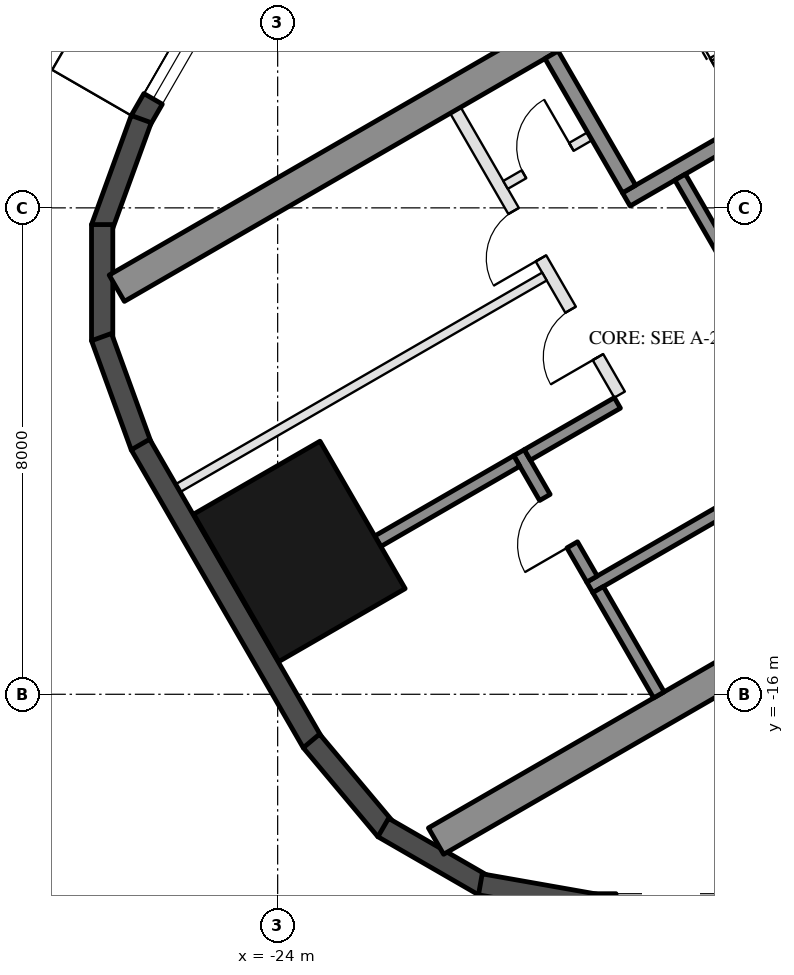
"""IFC4 building model, lengths in metres.
Left out: names, types, materials, properties, quantities, classifications, styles, units other than length and angle.
Written with IfcOpenShell. Run it as: python <this file> out.ifc"""

import sys

from ifc_helpers import new_model, si_unit, direction, frame, frame_2d, origin, origin_2d, place, context, subcontext, project, spatial, rectangle, hollow_rectangle, extrude, element, fill, save


model = new_model("IFC4")
c1 = context("Model", 3, precision=1e-05, world=origin(), true_north=direction((0.0, 1.0)))
c2 = subcontext(c1, "Body", "Model", "MODEL_VIEW")
j1 = project(units=[si_unit("LENGTHUNIT", "METRE"), si_unit("PLANEANGLEUNIT", "RADIAN")], contexts=[c1])
p1 = place(None, origin())
s1 = spatial("IfcSite", under=j1, at=p1, CompositionType="ELEMENT")
p2 = place(p1, origin())
s2 = spatial("IfcBuilding", under=s1, at=p2, CompositionType="ELEMENT")
p3 = place(p2, frame((0.0, 0.0, 90.9)))
s3 = spatial("IfcBuildingStorey", under=s2, at=p3, CompositionType="ELEMENT", Elevation=90.9)
p4 = place(p3, frame((-23.643, -13.65, 0.0), z_axis=(0.0, 0.0, 1.0), x_axis=(-0.5, 0.866025403784, 0.0)))
e1 = element("IfcColumn", 1, at=p4, inside=s3, PredefinedType="COLUMN", context=c2, shape_type="SweptSolid", body=[
    extrude(hollow_rectangle(XDim=2.8, YDim=2.4, WallThickness=0.07, at=origin_2d()), origin(), (0.0, 0.0, 1.0), 3.7),
])
p5 = place(p3, frame((-24.299, -3.176, 0.0), z_axis=(0.0, 0.0, 1.0), x_axis=(-0.500028278809, -0.866009076391, 0.0)))
e2 = element("IfcWall", 2, at=p5, inside=s3, PredefinedType="SOLIDWALL", context=c2, shape_type="SweptSolid", body=[
    extrude(rectangle(XDim=3.916, YDim=0.35, at=frame_2d((1.958, 0.0))), origin(), (0.0, 0.0, 1.0), 3.55),
])
p6 = place(p5, frame((1.7, 0.0, 0.3)))
e3 = element("IfcOpeningElement", 3, at=p6, cuts=e2, PredefinedType="OPENING", context=c2, shape_type="SweptSolid", body=[
    extrude(rectangle(XDim=1.8, YDim=2.65, at=frame_2d((0.9, 1.325))), frame((0.0, 0.185, 0.0), z_axis=(0.0, -1.0, 0.0), x_axis=(1.0, 0.0, 0.0)), (0.0, 0.0, 1.0), 0.37),
])
for number, where, z_axis, x_axis in (
    (4, (-26.244, -6.54, 0.0), (0.0, 0.0, 1.0), (-0.342, -0.94, 0.0)),
    (5, (-26.886, -8.275, 0.0), (0.0, 0.0, 1.0), (0.0, -1.0, 0.0)),
    (6, (-26.897, -10.125, 0.0), (0.0, 0.0, 1.0), (0.342, -0.94, 0.0)),
):
    element("IfcWall", number, at=place(p3, frame(where, z_axis=z_axis, x_axis=x_axis)), inside=s3, PredefinedType="SOLIDWALL", context=c2, shape_type="SweptSolid", body=[
        extrude(rectangle(XDim=1.91, YDim=0.35, at=frame_2d((0.955, 0.0))), origin(), (0.0, 0.0, 1.0), 3.55),
    ])
p7 = place(p3, frame((-26.257, -11.893, 0.0), z_axis=(0.0, 0.0, 1.0), x_axis=(0.500018773155, -0.866014564827, 0.0)))
e7 = element("IfcWall", 7, at=p7, inside=s3, PredefinedType="SOLIDWALL", context=c2, shape_type="SweptSolid", body=[
    extrude(rectangle(XDim=5.658, YDim=0.35, at=frame_2d((2.829, 0.0))), origin(), (0.0, 0.0, 1.0), 3.55),
])
for number, where, z_axis, x_axis in (
    (8, (-23.445, -16.768, 0.0), (0.0, 0.0, 1.0), (0.643, -0.766, 0.0)),
    (9, (-22.264, -18.192, 0.0), (0.0, 0.0, 1.0), (0.866, -0.5, 0.0)),
):
    element("IfcWall", number, at=place(p3, frame(where, z_axis=z_axis, x_axis=x_axis)), inside=s3, PredefinedType="SOLIDWALL", context=c2, shape_type="SweptSolid", body=[
        extrude(rectangle(XDim=1.91, YDim=0.35, at=frame_2d((0.955, 0.0))), origin(), (0.0, 0.0, 1.0), 3.55),
    ])
p8 = place(p3, frame((-20.667, -19.126, 0.0), z_axis=(0.0, 0.0, 1.0), x_axis=(0.984798995425, -0.173697837091, 0.0)))
e10 = element("IfcWall", 10, at=p8, inside=s3, PredefinedType="SOLIDWALL", context=c2, shape_type="SweptSolid", body=[
    extrude(rectangle(XDim=1.91, YDim=0.35, at=frame_2d((0.955, 0.0))), origin(), (0.0, 0.0, 1.0), 3.55),
])
p9 = place(p3, frame((-18.816, -19.455, 0.0), z_axis=(0.0, 0.0, 1.0), x_axis=(1.0, 0.0, 0.0)))
e11 = element("IfcWall", 11, at=p9, inside=s3, PredefinedType="SOLIDWALL", context=c2, shape_type="SweptSolid", body=[
    extrude(rectangle(XDim=11.816, YDim=0.35, at=frame_2d((5.908, 0.0))), origin(), (0.0, 0.0, 1.0), 3.55),
])
p10 = place(p9, frame((0.381, 0.0, 0.3)))
e12 = element("IfcOpeningElement", 12, at=p10, cuts=e11, PredefinedType="OPENING", context=c2, shape_type="SweptSolid", body=[
    extrude(rectangle(XDim=1.8, YDim=2.65, at=frame_2d((0.9, 1.325))), frame((0.0, 0.185, 0.0), z_axis=(0.0, -1.0, 0.0), x_axis=(1.0, 0.0, 0.0)), (0.0, 0.0, 1.0), 0.37),
])
p11 = place(p9, frame((7.716, 0.0, 0.0)))
e13 = element("IfcOpeningElement", 13, at=p11, cuts=e11, PredefinedType="OPENING", context=c2, shape_type="SweptSolid", body=[
    extrude(rectangle(XDim=2.4, YDim=2.4, at=frame_2d((1.2, 1.2))), frame((0.0, 0.185, 0.0), z_axis=(0.0, -1.0, 0.0), x_axis=(1.0, 0.0, 0.0)), (0.0, 0.0, 1.0), 0.37),
])
p12 = place(p9, frame((3.816, 0.0, 0.3)))
e14 = element("IfcOpeningElement", 14, at=p12, cuts=e11, PredefinedType="OPENING", context=c2, shape_type="SweptSolid", body=[
    extrude(rectangle(XDim=1.6, YDim=2.65, at=frame_2d((0.8, 1.325))), frame((0.0, 0.185, 0.0), z_axis=(0.0, -1.0, 0.0), x_axis=(1.0, 0.0, 0.0)), (0.0, 0.0, 1.0), 0.37),
])
p13 = place(p9, frame((5.716, 0.0, 0.3)))
e15 = element("IfcOpeningElement", 15, at=p13, cuts=e11, PredefinedType="OPENING", context=c2, shape_type="SweptSolid", body=[
    extrude(rectangle(XDim=1.6, YDim=2.65, at=frame_2d((0.8, 1.325))), frame((0.0, 0.185, 0.0), z_axis=(0.0, -1.0, 0.0), x_axis=(1.0, 0.0, 0.0)), (0.0, 0.0, 1.0), 0.37),
])
for number, where, z_axis, x_axis in (
    (16, (-13.797, -1.903, 0.0), (0.0, 0.0, 1.0), (-0.866, -0.5, 0.0)),
    (17, (-8.547, -10.997, 0.0), (0.0, 0.0, 1.0), (-0.866, -0.5, 0.0)),
):
    element("IfcWall", number, at=place(p3, frame(where, z_axis=z_axis, x_axis=x_axis)), inside=s3, PredefinedType="SHEAR", context=c2, shape_type="SweptSolid", body=[
        extrude(rectangle(XDim=14.837, YDim=0.5, at=frame_2d((7.418, 0.0))), origin(), (0.0, 0.0, 1.0), 3.5),
    ])
p14 = place(p3, frame((-12.681, -4.636, 0.0), z_axis=(0.0, 0.0, 1.0), x_axis=(-0.866021702275, -0.500006411147, 0.0)))
e18 = element("IfcWall", 18, at=p14, inside=s3, PredefinedType="SHEAR", context=c2, shape_type="SweptSolid", body=[
    extrude(rectangle(XDim=6.45, YDim=0.25, at=frame_2d((3.225, 0.0))), origin(), (0.0, 0.0, 1.0), 3.5),
])
p15 = place(p14, frame((0.3, 0.0, 0.0)))
e19 = element("IfcOpeningElement", 19, at=p15, cuts=e18, PredefinedType="OPENING", context=c2, shape_type="SweptSolid", body=[
    extrude(rectangle(XDim=1.0, YDim=2.1, at=frame_2d((0.5, 1.05))), frame((0.0, 0.135, 0.0), z_axis=(0.0, -1.0, 0.0), x_axis=(1.0, 0.0, 0.0)), (0.0, 0.0, 1.0), 0.27),
])
p16 = place(p3, frame((-19.496, -5.482, 0.0), z_axis=(0.0, 0.0, 1.0), x_axis=(0.499990435942, -0.866030925526, 0.0)))
e20 = element("IfcWall", 20, at=p16, inside=s3, PredefinedType="SHEAR", context=c2, shape_type="SweptSolid", body=[
    extrude(rectangle(XDim=2.55, YDim=0.25, at=frame_2d((1.275, 0.0))), origin(), (0.0, 0.0, 1.0), 3.5),
])
p17 = place(p3, frame((-17.381, -7.495, 0.0), z_axis=(0.0, 0.0, 1.0), x_axis=(0.500011755427, -0.866018616679, 0.0)))
e21 = element("IfcWall", 21, at=p17, inside=s3, PredefinedType="SHEAR", context=c2, shape_type="SweptSolid", body=[
    extrude(rectangle(XDim=2.8, YDim=0.2, at=frame_2d((1.4, 0.0))), origin(), (0.0, 0.0, 1.0), 3.5),
])
p18 = place(p3, frame((-10.068, -9.162, 0.0), z_axis=(0.0, 0.0, 1.0), x_axis=(-0.866032725843, -0.499987317609, 0.0)))
e22 = element("IfcWall", 22, at=p18, inside=s3, PredefinedType="SHEAR", context=c2, shape_type="SweptSolid", body=[
    extrude(rectangle(XDim=10.16, YDim=0.2, at=frame_2d((5.08, 0.0))), origin(), (0.0, 0.0, 1.0), 3.5),
])
p19 = place(p18, frame((0.72, 0.0, 0.0)))
e23 = element("IfcOpeningElement", 23, at=p19, cuts=e22, PredefinedType="OPENING", context=c2, shape_type="SweptSolid", body=[
    extrude(rectangle(XDim=0.9, YDim=2.1, at=frame_2d((0.45, 1.05))), frame((0.0, 0.11, 0.0), z_axis=(0.0, -1.0, 0.0), x_axis=(1.0, 0.0, 0.0)), (0.0, 0.0, 1.0), 0.22),
])
p20 = place(p18, frame((5.8, 0.0, 0.0)))
e24 = element("IfcOpeningElement", 24, at=p20, cuts=e22, PredefinedType="OPENING", context=c2, shape_type="SweptSolid", body=[
    extrude(rectangle(XDim=0.9, YDim=2.1, at=frame_2d((0.45, 1.05))), frame((0.0, 0.11, 0.0), z_axis=(0.0, -1.0, 0.0), x_axis=(1.0, 0.0, 0.0)), (0.0, 0.0, 1.0), 0.22),
])
p21 = place(p3, frame((-20.031, -12.026, 0.0), z_axis=(0.0, 0.0, 1.0), x_axis=(0.500033551112, -0.866006032174, 0.0)))
e25 = element("IfcWall", 25, at=p21, inside=s3, PredefinedType="SHEAR", context=c2, shape_type="SweptSolid", body=[
    extrude(rectangle(XDim=2.4, YDim=0.2, at=frame_2d((1.2, 0.0))), origin(), (0.0, 0.0, 1.0), 3.5),
])
p22 = place(p21, frame((0.85, 0.0, 0.0)))
e26 = element("IfcOpeningElement", 26, at=p22, cuts=e25, PredefinedType="OPENING", context=c2, shape_type="SweptSolid", body=[
    extrude(rectangle(XDim=0.9, YDim=2.1, at=frame_2d((0.45, 1.05))), frame((0.0, 0.11, 0.0), z_axis=(0.0, -1.0, 0.0), x_axis=(1.0, 0.0, 0.0)), (0.0, 0.0, 1.0), 0.22),
])
p23 = place(p3, frame((-18.413, -11.208, 0.0), z_axis=(0.0, 0.0, 1.0), x_axis=(-0.866038183914, -0.499977863513, 0.0)))
e27 = element("IfcWall", 27, at=p23, inside=s3, PredefinedType="SHEAR", context=c2, shape_type="SweptSolid", body=[
    extrude(rectangle(XDim=1.71, YDim=0.2, at=frame_2d((0.855, 0.0))), origin(), (0.0, 0.0, 1.0), 3.5),
])
p24 = place(p3, frame((-18.73, -14.278, 0.0), z_axis=(0.0, 0.0, 1.0), x_axis=(0.50002537861, -0.866010750942, 0.0)))
e28 = element("IfcWall", 28, at=p24, inside=s3, PredefinedType="SHEAR", context=c2, shape_type="SweptSolid", body=[
    extrude(rectangle(XDim=2.0, YDim=0.2, at=frame_2d((1.0, 0.0))), origin(), (0.0, 0.0, 1.0), 3.5),
])
p25 = place(p3, frame((-20.067, -12.163, 0.0), z_axis=(0.0, 0.0, 1.0), x_axis=(-0.866060851709, -0.499938597367, 0.0)))
e29 = element("IfcWall", 29, at=p25, inside=s3, PredefinedType="SHEAR", context=c2, shape_type="SweptSolid", body=[
    extrude(rectangle(XDim=2.64, YDim=0.2, at=frame_2d((1.32, 0.0))), origin(), (0.0, 0.0, 1.0), 3.5),
])
p26 = place(p3, frame((-21.076, -6.395, 0.0), z_axis=(0.0, 0.0, 1.0), x_axis=(0.50001468107, -0.866016927499, 0.0)))
e30 = element("IfcWall", 30, at=p26, inside=s3, PredefinedType="PARTITIONING", context=c2, shape_type="SweptSolid", body=[
    extrude(rectangle(XDim=5.4, YDim=0.2, at=frame_2d((2.7, 0.0))), origin(), (0.0, 0.0, 1.0), 3.5),
])
p27 = place(p26, frame((1.913, 0.0, 0.0)))
e31 = element("IfcOpeningElement", 31, at=p27, cuts=e30, PredefinedType="OPENING", context=c2, shape_type="SweptSolid", body=[
    extrude(rectangle(XDim=0.9, YDim=2.1, at=frame_2d((0.45, 1.05))), frame((0.0, 0.11, 0.0), z_axis=(0.0, -1.0, 0.0), x_axis=(1.0, 0.0, 0.0)), (0.0, 0.0, 1.0), 0.22),
])
p28 = place(p26, frame((3.788, 0.0, 0.0)))
e32 = element("IfcOpeningElement", 32, at=p28, cuts=e30, PredefinedType="OPENING", context=c2, shape_type="SweptSolid", body=[
    extrude(rectangle(XDim=0.9, YDim=2.1, at=frame_2d((0.45, 1.05))), frame((0.0, 0.11, 0.0), z_axis=(0.0, -1.0, 0.0), x_axis=(1.0, 0.0, 0.0)), (0.0, 0.0, 1.0), 0.22),
])
p29 = place(p3, frame((-18.866, -6.822, 0.0), z_axis=(0.0, 0.0, 1.0), x_axis=(-0.866028054938, -0.499995408039, 0.0)))
e33 = element("IfcWall", 33, at=p29, inside=s3, PredefinedType="PARTITIONING", context=c2, shape_type="SweptSolid", body=[
    extrude(rectangle(XDim=1.6, YDim=0.15, at=frame_2d((0.8, 0.0))), origin(), (0.0, 0.0, 1.0), 3.5),
])
p30 = place(p29, frame((0.35, 0.0, 0.0)))
e34 = element("IfcOpeningElement", 34, at=p30, cuts=e33, PredefinedType="OPENING", context=c2, shape_type="SweptSolid", body=[
    extrude(rectangle(XDim=0.9, YDim=2.1, at=frame_2d((0.45, 1.05))), frame((0.0, 0.085, 0.0), z_axis=(0.0, -1.0, 0.0), x_axis=(1.0, 0.0, 0.0)), (0.0, 0.0, 1.0), 0.17),
])
p31 = place(p3, frame((-19.613, -9.13, 0.0), z_axis=(0.0, 0.0, 1.0), x_axis=(-0.866031734426, -0.499989034847, 0.0)))
e35 = element("IfcWall", 35, at=p31, inside=s3, PredefinedType="PARTITIONING", context=c2, shape_type="SweptSolid", body=[
    extrude(rectangle(XDim=6.95, YDim=0.15, at=frame_2d((3.475, 0.0))), origin(), (0.0, 0.0, 1.0), 3.5),
])
p32 = place(p6, origin())
e36 = element("IfcWindow", 36, at=p32, inside=s3, PartitioningType="SINGLE_PANEL", PredefinedType="WINDOW", context=c2, shape_type="SweptSolid", body=[
    extrude(rectangle(XDim=1.8, YDim=2.65, at=frame_2d((0.9, 1.325))), frame((0.0, 0.03, 0.0), z_axis=(0.0, -1.0, 0.0), x_axis=(1.0, 0.0, 0.0)), (0.0, 0.0, 1.0), 0.06),
])
fill(e3, e36)
p33 = place(p30, frame((0.9, 0.0, 0.0), z_axis=(0.0, 0.0, 1.0), x_axis=(-1.0, 0.0, 0.0)))
e37 = element("IfcDoor", 37, at=p33, inside=s3, OperationType="SINGLE_SWING_RIGHT", PredefinedType="DOOR", context=c2, shape_type="SweptSolid", body=[
    extrude(rectangle(XDim=0.9, YDim=2.1, at=frame_2d((0.45, 1.05))), frame((0.0, 0.025, 0.0), z_axis=(0.0, -1.0, 0.0), x_axis=(1.0, 0.0, 0.0)), (0.0, 0.0, 1.0), 0.05),
])
fill(e34, e37)
p34 = place(p22, frame((0.9, 0.0, 0.0), z_axis=(0.0, 0.0, 1.0), x_axis=(-1.0, 0.0, 0.0)))
e38 = element("IfcDoor", 38, at=p34, inside=s3, OperationType="SINGLE_SWING_LEFT", PredefinedType="DOOR", context=c2, shape_type="SweptSolid", body=[
    extrude(rectangle(XDim=0.9, YDim=2.1, at=frame_2d((0.45, 1.05))), frame((0.0, 0.025, 0.0), z_axis=(0.0, -1.0, 0.0), x_axis=(1.0, 0.0, 0.0)), (0.0, 0.0, 1.0), 0.05),
])
fill(e26, e38)
p35 = place(p27, frame((0.9, 0.0, 0.0), z_axis=(0.0, 0.0, 1.0), x_axis=(-1.0, 0.0, 0.0)))
e39 = element("IfcDoor", 39, at=p35, inside=s3, OperationType="SINGLE_SWING_LEFT", PredefinedType="DOOR", context=c2, shape_type="SweptSolid", body=[
    extrude(rectangle(XDim=0.9, YDim=2.1, at=frame_2d((0.45, 1.05))), frame((0.0, 0.025, 0.0), z_axis=(0.0, -1.0, 0.0), x_axis=(1.0, 0.0, 0.0)), (0.0, 0.0, 1.0), 0.05),
])
fill(e31, e39)
p36 = place(p28, frame((0.9, 0.0, 0.0), z_axis=(0.0, 0.0, 1.0), x_axis=(-1.0, 0.0, 0.0)))
e40 = element("IfcDoor", 40, at=p36, inside=s3, OperationType="SINGLE_SWING_LEFT", PredefinedType="DOOR", context=c2, shape_type="SweptSolid", body=[
    extrude(rectangle(XDim=0.9, YDim=2.1, at=frame_2d((0.45, 1.05))), frame((0.0, 0.025, 0.0), z_axis=(0.0, -1.0, 0.0), x_axis=(1.0, 0.0, 0.0)), (0.0, 0.0, 1.0), 0.05),
])
fill(e32, e40)
save(model, sys.argv[1])
